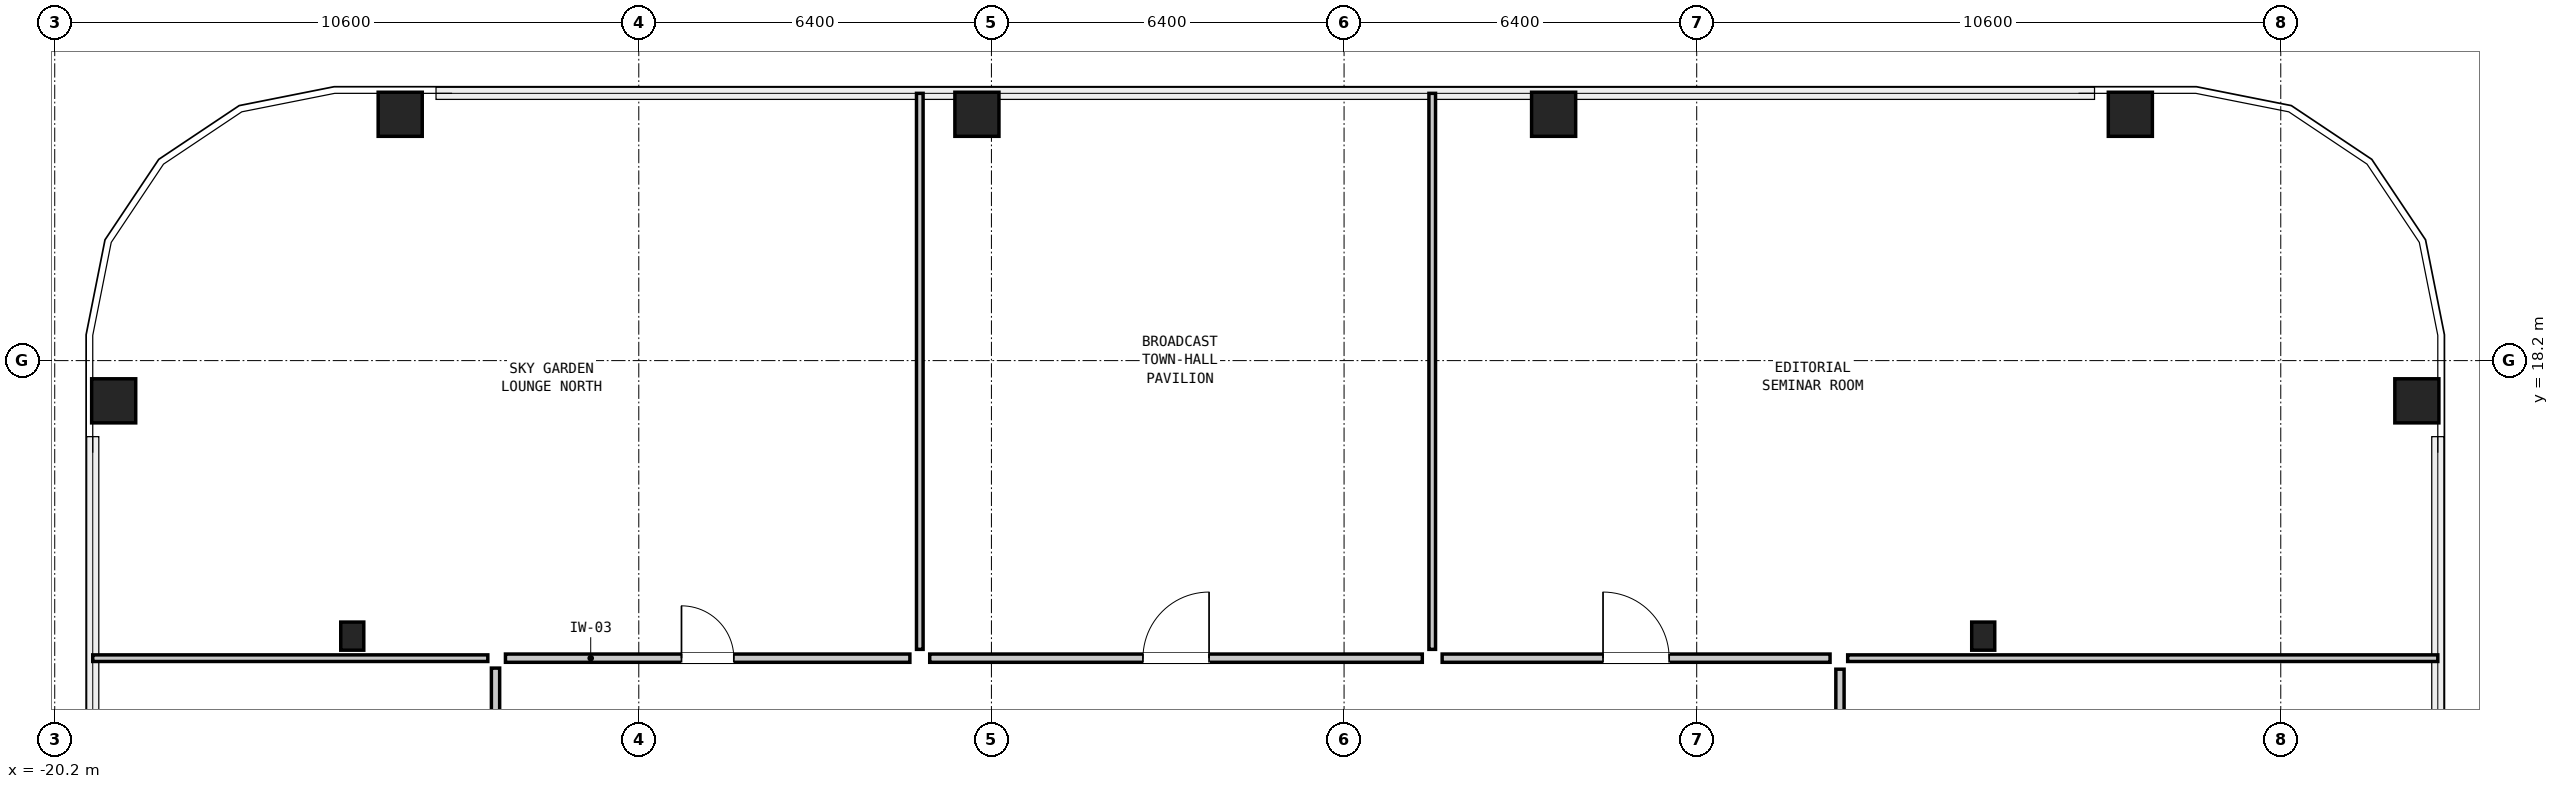
"""IFC4 building model, lengths in metres.
Left out: names, types, materials, properties, quantities, classifications, styles, units other than length and angle.
Written with IfcOpenShell. Run it as: python <this file> out.ifc"""

import sys

from ifc_helpers import new_model, si_unit, direction, frame, frame_2d, origin, origin_2d, place, context, subcontext, project, spatial, rectangle, hollow_rectangle, i_section, extrude, element, fill, save


model = new_model("IFC4")
c1 = context("Model", 3, precision=1e-05, world=origin(), true_north=direction((0.0, 1.0)))
c2 = subcontext(c1, "Body", "Model", "MODEL_VIEW")
j1 = project(units=[si_unit("LENGTHUNIT", "METRE"), si_unit("PLANEANGLEUNIT", "RADIAN")], contexts=[c1])
p1 = place(None, origin())
s1 = spatial("IfcSite", under=j1, at=p1, CompositionType="ELEMENT")
p2 = place(p1, origin())
s2 = spatial("IfcBuilding", under=s1, at=p2, CompositionType="ELEMENT")
p3 = place(p2, frame((0.0, 0.0, 61.5)))
s3 = spatial("IfcBuildingStorey", under=s2, at=p3, CompositionType="ELEMENT", Elevation=61.5)
for number, where, z_axis, x_axis in (
    (1, (22.67, 17.47, 0.0), (0.0, 0.0, 1.0), (0.0, 1.0, 0.0)),
    (2, (17.47, 22.67, 0.0), (0.0, 0.0, 1.0), (1.0, 0.0, 0.0)),
    (3, (7.003, 22.67, 0.0), (0.0, 0.0, 1.0), (1.0, 0.0, 0.0)),
    (4, (-3.463, 22.67, 0.0), (0.0, 0.0, 1.0), (1.0, 0.0, 0.0)),
    (5, (-13.93, 22.67, 0.0), (0.0, 0.0, 1.0), (1.0, 0.0, 0.0)),
    (6, (-19.13, 17.47, 0.0), (0.0, 0.0, 1.0), (0.0, 1.0, 0.0)),
):
    element("IfcColumn", number, at=place(p3, frame(where, z_axis=z_axis, x_axis=x_axis)), inside=s3, PredefinedType="COLUMN", context=c2, shape_type="SweptSolid", body=[
        extrude(hollow_rectangle(XDim=0.8, YDim=0.8, WallThickness=0.05, at=origin_2d()), origin(), (0.0, 0.0, 1.0), 3.6),
    ])
for number, where, z_axis, x_axis in (
    (7, (-14.8, 13.2, 0.0), (0.0, 0.0, 1.0), (1.0, 0.0, 0.0)),
    (8, (14.8, 13.2, 0.0), (0.0, 0.0, 1.0), (1.0, 0.0, 0.0)),
):
    element("IfcColumn", number, at=place(p3, frame(where, z_axis=z_axis, x_axis=x_axis)), inside=s3, PredefinedType="COLUMN", context=c2, shape_type="SweptSolid", body=[
        extrude(i_section(OverallWidth=0.418, OverallDepth=0.51, WebThickness=0.042, FlangeThickness=0.068, at=origin_2d()), origin(), (0.0, 0.0, 1.0), 3.6),
    ])
p4 = place(p3, frame((-19.51, 12.8, 0.0), z_axis=(0.0, 0.0, 1.0), x_axis=(1.0, 0.0, 0.0)))
e9 = element("IfcWall", 9, at=p4, inside=s3, PredefinedType="PARTITIONING", context=c2, shape_type="SweptSolid", body=[
    extrude(rectangle(XDim=7.17, YDim=0.12, at=frame_2d((3.585, 0.0))), origin(), (0.0, 0.0, 1.0), 3.22),
])
p5 = place(p3, frame((12.34, 12.8, 0.0), z_axis=(0.0, 0.0, 1.0), x_axis=(1.0, 0.0, 0.0)))
e10 = element("IfcWall", 10, at=p5, inside=s3, PredefinedType="PARTITIONING", context=c2, shape_type="SweptSolid", body=[
    extrude(rectangle(XDim=10.71, YDim=0.12, at=frame_2d((5.355, 0.0))), origin(), (0.0, 0.0, 1.0), 3.22),
])
for number, where, z_axis, x_axis in (
    (11, (-4.5, 12.96, 0.0), (0.0, 0.0, 1.0), (0.0, 1.0, 0.0)),
    (12, (4.8, 12.96, 0.0), (0.0, 0.0, 1.0), (0.0, 1.0, 0.0)),
):
    element("IfcWall", number, at=place(p3, frame(where, z_axis=z_axis, x_axis=x_axis)), inside=s3, PredefinedType="PARTITIONING", context=c2, shape_type="SweptSolid", body=[
        extrude(rectangle(XDim=10.09, YDim=0.12, at=frame_2d((5.045, 0.0))), origin(), (0.0, 0.0, 1.0), 3.22),
    ])
p6 = place(p3, frame((-12.02, 12.8, 0.0), z_axis=(0.0, 0.0, 1.0), x_axis=(1.0, 0.0, 0.0)))
e13 = element("IfcWall", 13, at=p6, inside=s3, PredefinedType="PARTITIONING", context=c2, shape_type="SweptSolid", body=[
    extrude(rectangle(XDim=7.34, YDim=0.15, at=frame_2d((3.67, 0.0))), origin(), (0.0, 0.0, 1.0), 3.22),
])
p7 = place(p6, frame((3.195, 0.0, 0.0)))
e14 = element("IfcOpeningElement", 14, at=p7, cuts=e13, PredefinedType="OPENING", context=c2, shape_type="SweptSolid", body=[
    extrude(rectangle(XDim=0.95, YDim=2.1, at=frame_2d((0.475, 1.05))), frame((0.0, 0.087, 0.0), z_axis=(0.0, -1.0, 0.0), x_axis=(1.0, 0.0, 0.0)), (0.0, 0.0, 1.0), 0.174),
])
p8 = place(p3, frame((-4.32, 12.8, 0.0), z_axis=(0.0, 0.0, 1.0), x_axis=(1.0, 0.0, 0.0)))
e15 = element("IfcWall", 15, at=p8, inside=s3, PredefinedType="PARTITIONING", context=c2, shape_type="SweptSolid", body=[
    extrude(rectangle(XDim=8.94, YDim=0.15, at=frame_2d((4.47, 0.0))), origin(), (0.0, 0.0, 1.0), 3.22),
])
p9 = place(p8, frame((3.87, 0.0, 0.0)))
e16 = element("IfcOpeningElement", 16, at=p9, cuts=e15, PredefinedType="OPENING", context=c2, shape_type="SweptSolid", body=[
    extrude(rectangle(XDim=1.2, YDim=2.1, at=frame_2d((0.6, 1.05))), frame((0.0, 0.087, 0.0), z_axis=(0.0, -1.0, 0.0), x_axis=(1.0, 0.0, 0.0)), (0.0, 0.0, 1.0), 0.174),
])
p10 = place(p3, frame((4.98, 12.8, 0.0), z_axis=(0.0, 0.0, 1.0), x_axis=(1.0, 0.0, 0.0)))
e17 = element("IfcWall", 17, at=p10, inside=s3, PredefinedType="PARTITIONING", context=c2, shape_type="SweptSolid", body=[
    extrude(rectangle(XDim=7.04, YDim=0.15, at=frame_2d((3.52, 0.0))), origin(), (0.0, 0.0, 1.0), 3.22),
])
p11 = place(p10, frame((2.92, 0.0, 0.0)))
e18 = element("IfcOpeningElement", 18, at=p11, cuts=e17, PredefinedType="OPENING", context=c2, shape_type="SweptSolid", body=[
    extrude(rectangle(XDim=1.2, YDim=2.1, at=frame_2d((0.6, 1.05))), frame((0.0, 0.087, 0.0), z_axis=(0.0, -1.0, 0.0), x_axis=(1.0, 0.0, 0.0)), (0.0, 0.0, 1.0), 0.174),
])
p12 = place(p3, frame((-12.2, -11.42, 0.0), z_axis=(0.0, 0.0, 1.0), x_axis=(0.0, 1.0, 0.0)))
e19 = element("IfcWall", 19, at=p12, inside=s3, PredefinedType="PARTITIONING", context=c2, shape_type="SweptSolid", body=[
    extrude(rectangle(XDim=24.04, YDim=0.15, at=frame_2d((12.02, 0.0))), origin(), (0.0, 0.0, 1.0), 3.22),
])
p13 = place(p12, frame((11.545, 0.0, 0.0)))
e20 = element("IfcOpeningElement", 20, at=p13, cuts=e19, PredefinedType="OPENING", context=c2, shape_type="SweptSolid", body=[
    extrude(rectangle(XDim=0.95, YDim=2.1, at=frame_2d((0.475, 1.05))), frame((0.0, 0.087, 0.0), z_axis=(0.0, -1.0, 0.0), x_axis=(1.0, 0.0, 0.0)), (0.0, 0.0, 1.0), 0.174),
])
p14 = place(p3, frame((12.2, 3.8, 0.0), z_axis=(0.0, 0.0, 1.0), x_axis=(0.0, 1.0, 0.0)))
e21 = element("IfcWall", 21, at=p14, inside=s3, PredefinedType="PARTITIONING", context=c2, shape_type="SweptSolid", body=[
    extrude(rectangle(XDim=8.8, YDim=0.15, at=frame_2d((4.4, 0.0))), origin(), (0.0, 0.0, 1.0), 3.22),
])
p15 = place(p14, frame((3.925, 0.0, 0.0)))
e22 = element("IfcOpeningElement", 22, at=p15, cuts=e21, PredefinedType="OPENING", context=c2, shape_type="SweptSolid", body=[
    extrude(rectangle(XDim=0.95, YDim=2.1, at=frame_2d((0.475, 1.05))), frame((0.0, 0.087, 0.0), z_axis=(0.0, -1.0, 0.0), x_axis=(1.0, 0.0, 0.0)), (0.0, 0.0, 1.0), 0.174),
])
p16 = place(p7, origin())
e23 = element("IfcDoor", 23, at=p16, inside=s3, OperationType="SINGLE_SWING_LEFT", PredefinedType="DOOR", context=c2, shape_type="SweptSolid", body=[
    extrude(rectangle(XDim=0.95, YDim=2.1, at=frame_2d((0.475, 1.05))), frame((0.0, 0.025, 0.0), z_axis=(0.0, -1.0, 0.0), x_axis=(1.0, 0.0, 0.0)), (0.0, 0.0, 1.0), 0.05),
])
fill(e14, e23)
p17 = place(p9, origin())
e24 = element("IfcDoor", 24, at=p17, inside=s3, OperationType="SINGLE_SWING_RIGHT", PredefinedType="DOOR", context=c2, shape_type="SweptSolid", body=[
    extrude(rectangle(XDim=1.2, YDim=2.1, at=frame_2d((0.6, 1.05))), frame((0.0, 0.025, 0.0), z_axis=(0.0, -1.0, 0.0), x_axis=(1.0, 0.0, 0.0)), (0.0, 0.0, 1.0), 0.05),
])
fill(e16, e24)
p18 = place(p11, origin())
e25 = element("IfcDoor", 25, at=p18, inside=s3, OperationType="SINGLE_SWING_LEFT", PredefinedType="DOOR", context=c2, shape_type="SweptSolid", body=[
    extrude(rectangle(XDim=1.2, YDim=2.1, at=frame_2d((0.6, 1.05))), frame((0.0, 0.025, 0.0), z_axis=(0.0, -1.0, 0.0), x_axis=(1.0, 0.0, 0.0)), (0.0, 0.0, 1.0), 0.05),
])
fill(e18, e25)
save(model, sys.argv[1])
